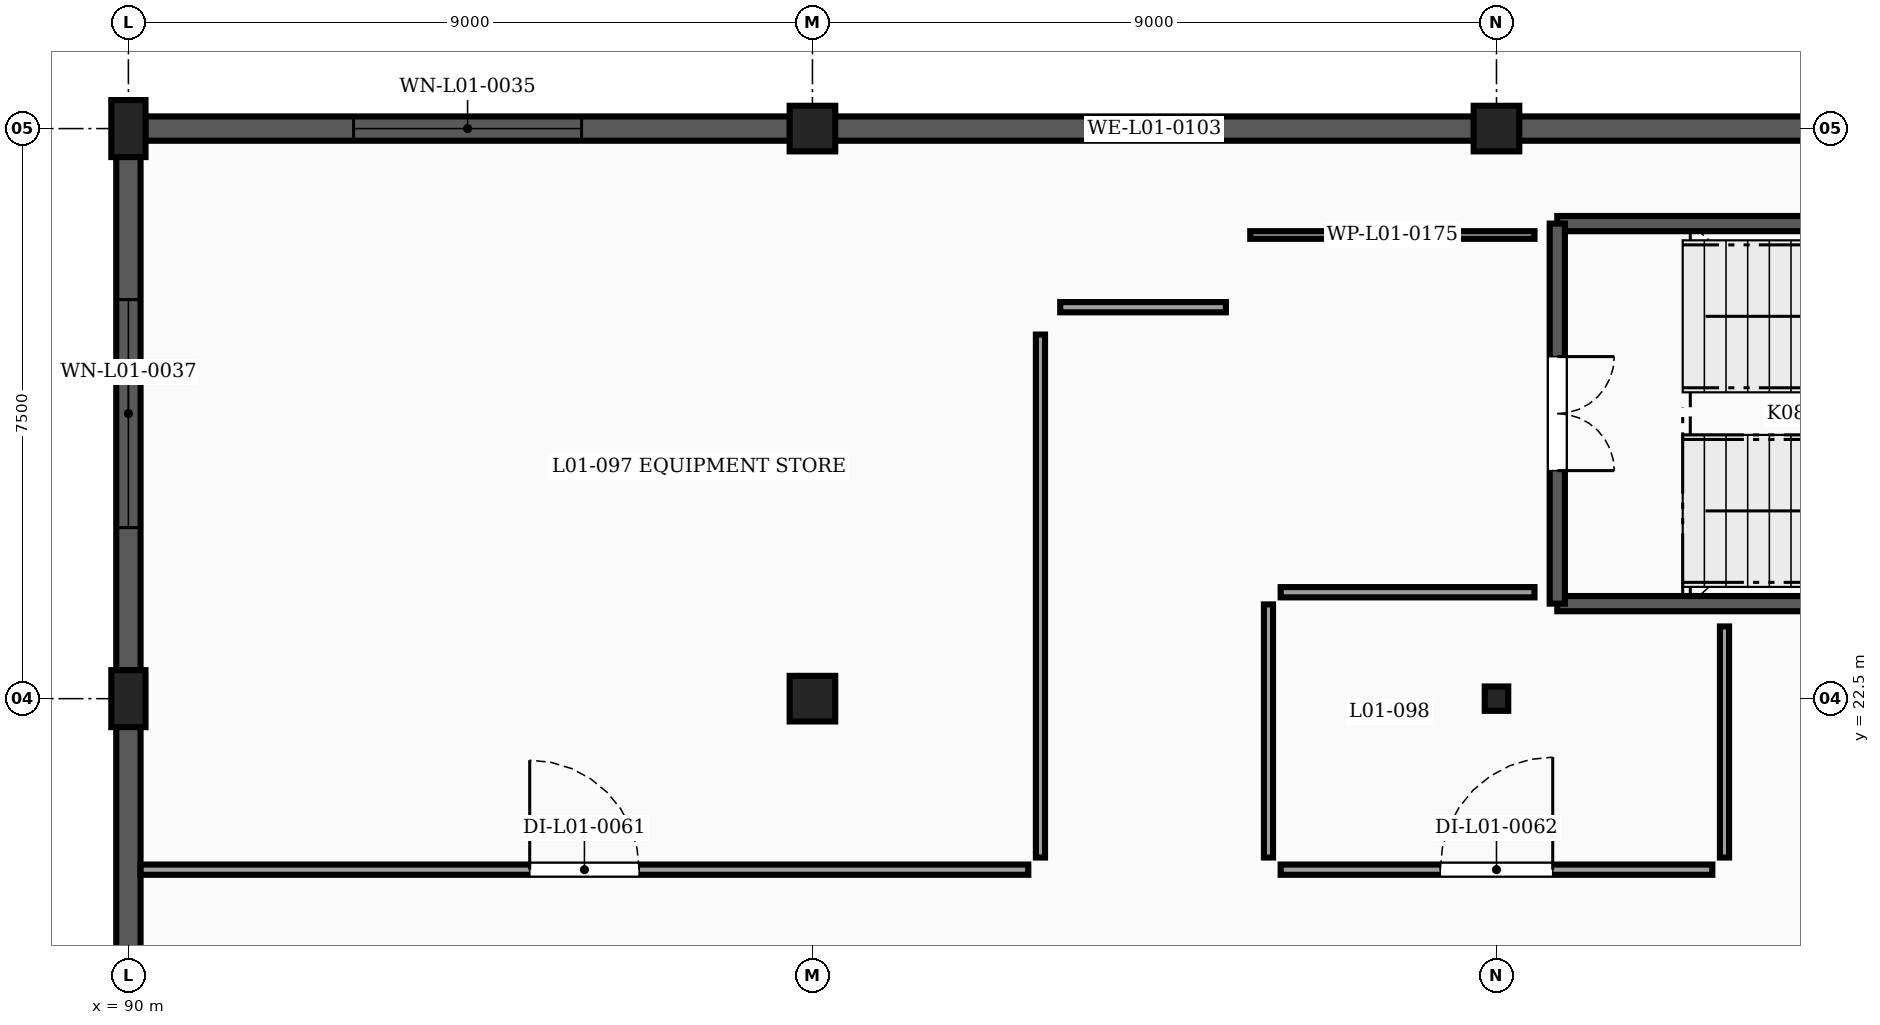
"""IFC4 building model, lengths in metres.
Left out: names, types, materials, properties, quantities, classifications, styles, units other than length and angle.
Written with IfcOpenShell. Run it as: python <this file> out.ifc"""

import sys

from ifc_helpers import new_model, si_unit, direction, frame, frame_2d, origin, origin_2d, place, context, subcontext, project, spatial, rectangle, i_section, extrude, element, fill, save


model = new_model("IFC4")
c1 = context("Model", 3, precision=1e-05, world=origin(), true_north=direction((0.0, 1.0)))
c2 = subcontext(c1, "Body", "Model", "MODEL_VIEW")
j1 = project(units=[si_unit("LENGTHUNIT", "METRE"), si_unit("PLANEANGLEUNIT", "RADIAN")], contexts=[c1])
p1 = place(None, origin())
s1 = spatial("IfcSite", under=j1, at=p1, CompositionType="ELEMENT")
p2 = place(p1, origin())
s2 = spatial("IfcBuilding", under=s1, at=p2, CompositionType="ELEMENT")
p3 = place(p2, frame((0.0, 0.0, 4.5)))
s3 = spatial("IfcBuildingStorey", under=s2, at=p3, CompositionType="ELEMENT", Elevation=4.5)
p4 = place(p3, frame((90.0, 22.5, 0.0), z_axis=(0.0, 0.0, 1.0), x_axis=(1.0, 0.0, 0.0)))
e1 = element("IfcColumn", 1, at=p4, inside=s3, PredefinedType="COLUMN", context=c2, shape_type="SweptSolid", body=[
    extrude(rectangle(XDim=0.45, YDim=0.75, at=origin_2d()), origin(), (0.0, 0.0, 1.0), 4.0),
])
p5 = place(p3, frame((99.0, 22.5, 0.0), z_axis=(0.0, 0.0, 1.0), x_axis=(1.0, 0.0, 0.0)))
e2 = element("IfcColumn", 2, at=p5, inside=s3, PredefinedType="COLUMN", context=c2, shape_type="SweptSolid", body=[
    extrude(rectangle(XDim=0.6, YDim=0.6, at=origin_2d()), origin(), (0.0, 0.0, 1.0), 4.0),
])
p6 = place(p3, frame((108.0, 22.5, 0.0), z_axis=(0.0, 0.0, 1.0), x_axis=(1.0, 0.0, 0.0)))
e3 = element("IfcColumn", 3, at=p6, inside=s3, PredefinedType="COLUMN", context=c2, shape_type="SweptSolid", body=[
    extrude(i_section(OverallWidth=0.309, OverallDepth=0.321, WebThickness=0.014, FlangeThickness=0.022, FilletRadius=0.017, at=origin_2d()), origin(), (0.0, 0.0, 1.0), 4.0),
])
p7 = place(p3, frame((90.0, 30.0, 0.0), z_axis=(0.0, 0.0, 1.0), x_axis=(1.0, 0.0, 0.0)))
e4 = element("IfcColumn", 4, at=p7, inside=s3, PredefinedType="COLUMN", context=c2, shape_type="SweptSolid", body=[
    extrude(rectangle(XDim=0.45, YDim=0.75, at=origin_2d()), origin(), (0.0, 0.0, 1.0), 4.0),
])
for number, where, z_axis, x_axis in (
    (5, (99.0, 30.0, 0.0), (0.0, 0.0, 1.0), (1.0, 0.0, 0.0)),
    (6, (108.0, 30.0, 0.0), (0.0, 0.0, 1.0), (1.0, 0.0, 0.0)),
):
    element("IfcColumn", number, at=place(p3, frame(where, z_axis=z_axis, x_axis=x_axis)), inside=s3, PredefinedType="COLUMN", context=c2, shape_type="SweptSolid", body=[
        extrude(rectangle(XDim=0.6, YDim=0.6, at=origin_2d()), origin(), (0.0, 0.0, 1.0), 4.0),
    ])
p8 = place(p3, frame((90.221, 30.0, 0.0), z_axis=(0.0, 0.0, 1.0), x_axis=(1.0, 0.0, 0.0)))
e7 = element("IfcWall", 7, at=p8, inside=s3, PredefinedType="SOLIDWALL", context=c2, shape_type="SweptSolid", body=[
    extrude(rectangle(XDim=8.483, YDim=0.32, at=frame_2d((4.242, 0.0))), origin(), (0.0, 0.0, 1.0), 3.41),
])
p9 = place(p8, frame((2.741, 0.0, 2.11)))
e8 = element("IfcOpeningElement", 8, at=p9, cuts=e7, PredefinedType="OPENING", context=c2, shape_type="SweptSolid", body=[
    extrude(rectangle(XDim=3.0, YDim=1.1, at=frame_2d((1.5, 0.55))), frame((0.0, 0.17, 0.0), z_axis=(0.0, -1.0, 0.0), x_axis=(1.0, 0.0, 0.0)), (0.0, 0.0, 1.0), 0.34),
])
for number, where, z_axis, x_axis in (
    (9, (99.296, 30.0, 0.0), (0.0, 0.0, 1.0), (1.0, 0.0, 0.0)),
    (10, (108.296, 30.0, 0.0), (0.0, 0.0, 1.0), (1.0, 0.0, 0.0)),
):
    element("IfcWall", number, at=place(p3, frame(where, z_axis=z_axis, x_axis=x_axis)), inside=s3, PredefinedType="SOLIDWALL", context=c2, shape_type="SweptSolid", body=[
        extrude(rectangle(XDim=8.408, YDim=0.32, at=frame_2d((4.204, 0.0))), origin(), (0.0, 0.0, 1.0), 3.41),
    ])
p10 = place(p3, frame((90.0, 15.371, 0.0), z_axis=(0.0, 0.0, 1.0), x_axis=(0.0, 1.0, 0.0)))
e11 = element("IfcWall", 11, at=p10, inside=s3, PredefinedType="SOLIDWALL", context=c2, shape_type="SweptSolid", body=[
    extrude(rectangle(XDim=6.758, YDim=0.32, at=frame_2d((3.379, 0.0))), origin(), (0.0, 0.0, 1.0), 2.792),
])
p11 = place(p3, frame((90.0, 22.871, 0.0), z_axis=(0.0, 0.0, 1.0), x_axis=(0.0, 1.0, 0.0)))
e12 = element("IfcWall", 12, at=p11, inside=s3, PredefinedType="SOLIDWALL", context=c2, shape_type="SweptSolid", body=[
    extrude(rectangle(XDim=6.758, YDim=0.32, at=frame_2d((3.379, 0.0))), origin(), (0.0, 0.0, 1.0), 2.792),
])
p12 = place(p11, frame((1.879, 0.0, 1.492)))
e13 = element("IfcOpeningElement", 13, at=p12, cuts=e12, PredefinedType="OPENING", context=c2, shape_type="SweptSolid", body=[
    extrude(rectangle(XDim=3.0, YDim=1.1, at=frame_2d((1.5, 0.55))), frame((0.0, 0.17, 0.0), z_axis=(0.0, -1.0, 0.0), x_axis=(1.0, 0.0, 0.0)), (0.0, 0.0, 1.0), 0.34),
])
for number, where, z_axis, x_axis in (
    (14, (108.8, 23.75, 0.0), (0.0, 0.0, 1.0), (1.0, 0.0, 0.0)),
    (15, (116.2, 28.75, 0.0), (0.0, 0.0, 1.0), (-1.0, 0.0, 0.0)),
):
    element("IfcWall", number, at=place(p3, frame(where, z_axis=z_axis, x_axis=x_axis)), inside=s3, PredefinedType="SHEAR", context=c2, shape_type="SweptSolid", body=[
        extrude(rectangle(XDim=7.4, YDim=0.2, at=frame_2d((3.7, 0.0))), origin(), (0.0, 0.0, 1.0), 3.77),
    ])
p13 = place(p3, frame((108.8, 28.75, 0.0), z_axis=(0.0, 0.0, 1.0), x_axis=(0.0, -1.0, 0.0)))
e16 = element("IfcWall", 16, at=p13, inside=s3, PredefinedType="SHEAR", context=c2, shape_type="SweptSolid", body=[
    extrude(rectangle(XDim=5.0, YDim=0.2, at=frame_2d((2.5, 0.0))), origin(), (0.0, 0.0, 1.0), 3.77),
])
p14 = place(p13, frame((1.75, 0.0, 0.0)))
e17 = element("IfcOpeningElement", 17, at=p14, cuts=e16, PredefinedType="OPENING", context=c2, shape_type="SweptSolid", body=[
    extrude(rectangle(XDim=1.5, YDim=2.15, at=frame_2d((0.75, 1.075))), frame((0.0, 0.11, 0.0), z_axis=(0.0, -1.0, 0.0), x_axis=(1.0, 0.0, 0.0)), (0.0, 0.0, 1.0), 0.22),
])
p15 = place(p3, frame((90.16, 20.25, 0.0), z_axis=(0.0, 0.0, 1.0), x_axis=(1.0, 0.0, 0.0)))
e18 = element("IfcWall", 18, at=p15, inside=s3, PredefinedType="PARTITIONING", context=c2, shape_type="SweptSolid", body=[
    extrude(rectangle(XDim=11.68, YDim=0.135, at=frame_2d((5.84, 0.0))), origin(), (0.0, 0.0, 1.0), 3.77),
])
p16 = place(p15, frame((5.12, 0.0, 0.0)))
e19 = element("IfcOpeningElement", 19, at=p16, cuts=e18, PredefinedType="OPENING", context=c2, shape_type="SweptSolid", body=[
    extrude(rectangle(XDim=1.44, YDim=2.18, at=frame_2d((0.72, 1.09))), frame((0.0, 0.077, 0.0), z_axis=(0.0, -1.0, 0.0), x_axis=(1.0, 0.0, 0.0)), (0.0, 0.0, 1.0), 0.155),
])
p17 = place(p3, frame((102.0, 20.41, 0.0), z_axis=(0.0, 0.0, 1.0), x_axis=(0.0, 1.0, 0.0)))
e20 = element("IfcWall", 20, at=p17, inside=s3, PredefinedType="PARTITIONING", context=c2, shape_type="SweptSolid", body=[
    extrude(rectangle(XDim=6.88, YDim=0.12, at=frame_2d((3.44, 0.0))), origin(), (0.0, 0.0, 1.0), 3.362),
])
p18 = place(p3, frame((102.26, 27.65, 0.0), z_axis=(0.0, 0.0, 1.0), x_axis=(1.0, 0.0, 0.0)))
e21 = element("IfcWall", 21, at=p18, inside=s3, PredefinedType="PARTITIONING", context=c2, shape_type="SweptSolid", body=[
    extrude(rectangle(XDim=2.18, YDim=0.135, at=frame_2d((1.09, 0.0))), origin(), (0.0, 0.0, 1.0), 3.77),
])
p19 = place(p3, frame((104.76, 28.6, 0.0), z_axis=(0.0, 0.0, 1.0), x_axis=(1.0, 0.0, 0.0)))
e22 = element("IfcWall", 22, at=p19, inside=s3, PredefinedType="PARTITIONING", context=c2, shape_type="SweptSolid", body=[
    extrude(rectangle(XDim=3.74, YDim=0.1, at=frame_2d((1.87, 0.0))), origin(), (0.0, 0.0, 1.0), 3.77),
])
p20 = place(p3, frame((108.5, 23.9, 0.0), z_axis=(0.0, 0.0, 1.0), x_axis=(-1.0, 0.0, 0.0)))
e23 = element("IfcWall", 23, at=p20, inside=s3, PredefinedType="PARTITIONING", context=c2, shape_type="SweptSolid", body=[
    extrude(rectangle(XDim=3.34, YDim=0.135, at=frame_2d((1.67, 0.0))), origin(), (0.0, 0.0, 1.0), 3.77),
])
p21 = place(p3, frame((105.0, 23.74, 0.0), z_axis=(0.0, 0.0, 1.0), x_axis=(0.0, -1.0, 0.0)))
e24 = element("IfcWall", 24, at=p21, inside=s3, PredefinedType="PARTITIONING", context=c2, shape_type="SweptSolid", body=[
    extrude(rectangle(XDim=3.33, YDim=0.12, at=frame_2d((1.665, 0.0))), origin(), (0.0, 0.0, 1.0), 3.362),
])
p22 = place(p3, frame((105.16, 20.25, 0.0), z_axis=(0.0, 0.0, 1.0), x_axis=(1.0, 0.0, 0.0)))
e25 = element("IfcWall", 25, at=p22, inside=s3, PredefinedType="PARTITIONING", context=c2, shape_type="SweptSolid", body=[
    extrude(rectangle(XDim=5.68, YDim=0.135, at=frame_2d((2.84, 0.0))), origin(), (0.0, 0.0, 1.0), 3.77),
])
p23 = place(p22, frame((2.1, 0.0, 0.0)))
e26 = element("IfcOpeningElement", 26, at=p23, cuts=e25, PredefinedType="OPENING", context=c2, shape_type="SweptSolid", body=[
    extrude(rectangle(XDim=1.48, YDim=2.2, at=frame_2d((0.74, 1.1))), frame((0.0, 0.077, 0.0), z_axis=(0.0, -1.0, 0.0), x_axis=(1.0, 0.0, 0.0)), (0.0, 0.0, 1.0), 0.155),
])
p24 = place(p3, frame((111.0, 20.41, 0.0), z_axis=(0.0, 0.0, 1.0), x_axis=(0.0, 1.0, 0.0)))
e27 = element("IfcWall", 27, at=p24, inside=s3, PredefinedType="PARTITIONING", context=c2, shape_type="SweptSolid", body=[
    extrude(rectangle(XDim=3.04, YDim=0.12, at=frame_2d((1.52, 0.0))), origin(), (0.0, 0.0, 1.0), 3.362),
])
p25 = place(p9, origin())
e28 = element("IfcWindow", 28, at=p25, inside=s3, PartitioningType="TRIPLE_PANEL_VERTICAL", PredefinedType="WINDOW", context=c2, shape_type="SweptSolid", body=[
    extrude(rectangle(XDim=3.0, YDim=1.1, at=frame_2d((1.5, 0.55))), frame((0.0, 0.03, 0.0), z_axis=(0.0, -1.0, 0.0), x_axis=(1.0, 0.0, 0.0)), (0.0, 0.0, 1.0), 0.06),
])
fill(e8, e28)
p26 = place(p12, origin())
e29 = element("IfcWindow", 29, at=p26, inside=s3, PartitioningType="TRIPLE_PANEL_VERTICAL", PredefinedType="WINDOW", context=c2, shape_type="SweptSolid", body=[
    extrude(rectangle(XDim=3.0, YDim=1.1, at=frame_2d((1.5, 0.55))), frame((0.0, 0.03, 0.0), z_axis=(0.0, -1.0, 0.0), x_axis=(1.0, 0.0, 0.0)), (0.0, 0.0, 1.0), 0.06),
])
fill(e13, e29)
p27 = place(p14, origin())
e30 = element("IfcDoor", 30, at=p27, inside=s3, OperationType="DOUBLE_DOOR_SINGLE_SWING", PredefinedType="DOOR", context=c2, shape_type="SweptSolid", body=[
    extrude(rectangle(XDim=1.5, YDim=2.15, at=frame_2d((0.75, 1.075))), frame((0.0, 0.025, 0.0), z_axis=(0.0, -1.0, 0.0), x_axis=(1.0, 0.0, 0.0)), (0.0, 0.0, 1.0), 0.05),
])
fill(e17, e30)
p28 = place(p16, origin())
e31 = element("IfcDoor", 31, at=p28, inside=s3, OperationType="SINGLE_SWING_LEFT", PredefinedType="DOOR", context=c2, shape_type="SweptSolid", body=[
    extrude(rectangle(XDim=1.44, YDim=2.18, at=frame_2d((0.72, 1.09))), frame((0.0, 0.025, 0.0), z_axis=(0.0, -1.0, 0.0), x_axis=(1.0, 0.0, 0.0)), (0.0, 0.0, 1.0), 0.05),
])
fill(e19, e31)
p29 = place(p23, origin())
e32 = element("IfcDoor", 32, at=p29, inside=s3, OperationType="SINGLE_SWING_RIGHT", PredefinedType="DOOR", context=c2, shape_type="SweptSolid", body=[
    extrude(rectangle(XDim=1.48, YDim=2.2, at=frame_2d((0.74, 1.1))), frame((0.0, 0.025, 0.0), z_axis=(0.0, -1.0, 0.0), x_axis=(1.0, 0.0, 0.0)), (0.0, 0.0, 1.0), 0.05),
])
fill(e26, e32)
save(model, sys.argv[1])
